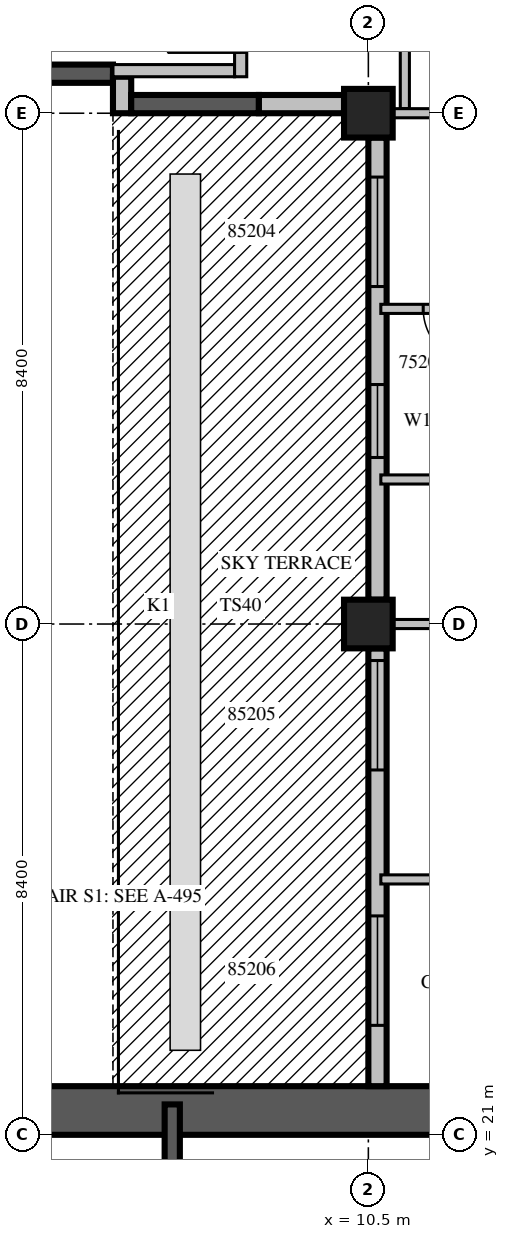
"""IFC4 building model, lengths in metres.
Left out: names, types, materials, properties, quantities, classifications, styles, units other than length and angle.
Written with IfcOpenShell. Run it as: python <this file> out.ifc"""

import sys

from ifc_helpers import new_model, si_unit, direction, frame, frame_2d, origin, origin_2d, place, context, subcontext, project, spatial, rectangle, extrude, source, transform, mapped, element, fill, save


model = new_model("IFC4")
c1 = context("Model", 3, precision=1e-05, world=origin(), true_north=direction((0.0, 1.0)))
c2 = subcontext(c1, "Body", "Model", "MODEL_VIEW")
j1 = project(units=[si_unit("LENGTHUNIT", "METRE"), si_unit("PLANEANGLEUNIT", "RADIAN")], contexts=[c1])
p1 = place(None, origin())
s1 = spatial("IfcSite", under=j1, at=p1, CompositionType="ELEMENT")
p2 = place(p1, origin())
s2 = spatial("IfcBuilding", under=s1, at=p2, CompositionType="ELEMENT")
p3 = place(p2, frame((0.0, 0.0, 231.0)))
s3 = spatial("IfcBuildingStorey", under=s2, at=p3, CompositionType="ELEMENT", Elevation=231.0)
m1 = source(origin(), c2, "Body", "SweptSolid", [
    extrude(rectangle(XDim=0.8, YDim=0.8, at=origin_2d()), origin(), (0.0, 0.0, 1.0), 3.8),
])
for number, where, z_axis, x_axis in (
    (1, (10.5, 29.4, 0.0), (0.0, 0.0, 1.0), (1.0, 0.0, 0.0)),
    (2, (10.5, 37.8, 0.0), (0.0, 0.0, 1.0), (1.0, 0.0, 0.0)),
):
    element("IfcColumn", number, at=place(p3, frame(where, z_axis=z_axis, x_axis=x_axis)), inside=s3, PredefinedType="COLUMN", context=c2, shape_type="MappedRepresentation", body=[
        mapped(m1, transform((0.0, 0.0, 0.0), scale=1.0)),
    ])
m2 = source(origin(), c2, "Body", "SweptSolid", [
    extrude(rectangle(XDim=16.8, YDim=0.8, at=frame_2d((8.4, 0.0))), origin(), (0.0, 0.0, 1.0), 3.8),
])
p4 = place(p3, frame((4.2, 21.4, 0.0), z_axis=(0.0, 0.0, 1.0), x_axis=(1.0, 0.0, 0.0)))
e3 = element("IfcWall", 3, at=p4, inside=s3, PredefinedType="SHEAR", context=c2, shape_type="MappedRepresentation", body=[
    mapped(m2, transform((0.0, 0.0, 0.0), scale=1.0)),
])
m3 = source(origin(), c2, "Body", "SweptSolid", [
    extrude(rectangle(XDim=1.2, YDim=2.1, at=frame_2d((0.6, 1.05))), frame((0.0, 0.41, 0.0), z_axis=(0.0, -1.0, 0.0), x_axis=(1.0, 0.0, 0.0)), (0.0, 0.0, 1.0), 0.82),
])
p5 = place(p4, frame((7.4, 0.0, 0.0)))
e4 = element("IfcOpeningElement", 4, at=p5, cuts=e3, PredefinedType="OPENING", context=c2, shape_type="MappedRepresentation", body=[
    mapped(m3, transform((0.0, 0.0, 0.0), scale=1.0)),
])
m4 = source(origin(), c2, "Body", "SweptSolid", [
    extrude(rectangle(XDim=6.1, YDim=0.3, at=frame_2d((3.05, 0.0))), origin(), (0.0, 0.0, 1.0), 3.4),
])
p6 = place(p3, frame((0.2, 38.45, 0.0), z_axis=(0.0, 0.0, 1.0), x_axis=(1.0, 0.0, 0.0)))
e5 = element("IfcWall", 5, at=p6, inside=s3, PredefinedType="SOLIDWALL", context=c2, shape_type="MappedRepresentation", body=[
    mapped(m4, transform((0.0, 0.0, 0.0), scale=1.0)),
])
m5 = source(origin(), c2, "Body", "SweptSolid", [
    extrude(rectangle(XDim=0.6, YDim=0.3, at=frame_2d((0.3, 0.0))), origin(), (0.0, 0.0, 1.0), 3.4),
])
p7 = place(p3, frame((6.45, 38.4, 0.0), z_axis=(0.0, 0.0, 1.0), x_axis=(0.0, -1.0, 0.0)))
e6 = element("IfcWall", 6, at=p7, inside=s3, PredefinedType="STANDARD", context=c2, shape_type="MappedRepresentation", body=[
    mapped(m5, transform((0.0, 0.0, 0.0), scale=1.0)),
])
m6 = source(origin(), c2, "Body", "SweptSolid", [
    extrude(rectangle(XDim=2.1, YDim=0.3, at=frame_2d((1.05, 0.0))), origin(), (0.0, 0.0, 1.0), 3.4),
])
p8 = place(p3, frame((6.6, 37.95, 0.0), z_axis=(0.0, 0.0, 1.0), x_axis=(1.0, 0.0, 0.0)))
e7 = element("IfcWall", 7, at=p8, inside=s3, PredefinedType="SOLIDWALL", context=c2, shape_type="MappedRepresentation", body=[
    mapped(m6, transform((0.0, 0.0, 0.0), scale=1.0)),
])
p9 = place(p3, frame((8.7, 37.95, 0.0), z_axis=(0.0, 0.0, 1.0), x_axis=(1.0, 0.0, 0.0)))
e8 = element("IfcWall", 8, at=p9, inside=s3, PredefinedType="STANDARD", context=c2, shape_type="SweptSolid", body=[
    extrude(rectangle(XDim=1.4, YDim=0.3, at=frame_2d((0.7, 0.0))), origin(), (0.0, 0.0, 1.0), 3.4),
])
m7 = source(origin(), c2, "Body", "SweptSolid", [
    extrude(rectangle(XDim=7.6, YDim=0.3, at=frame_2d((3.8, 0.0))), origin(), (0.0, 0.0, 1.0), 3.4),
])
p10 = place(p3, frame((10.65, 37.4, 0.0), z_axis=(0.0, 0.0, 1.0), x_axis=(0.0, -1.0, 0.0)))
e9 = element("IfcWall", 9, at=p10, inside=s3, PredefinedType="STANDARD", context=c2, shape_type="MappedRepresentation", body=[
    mapped(m7, transform((0.0, 0.0, 0.0), scale=1.0)),
])
m8 = source(origin(), c2, "Body", "SweptSolid", [
    extrude(rectangle(XDim=1.8, YDim=2.4, at=frame_2d((0.9, 1.2))), frame((0.0, 0.16, 0.0), z_axis=(0.0, -1.0, 0.0), x_axis=(1.0, 0.0, 0.0)), (0.0, 0.0, 1.0), 0.32),
])
p11 = place(p10, frame((0.65, 0.0, 0.0)))
e10 = element("IfcOpeningElement", 10, at=p11, cuts=e9, PredefinedType="OPENING", context=c2, shape_type="MappedRepresentation", body=[
    mapped(m8, transform((0.0, 0.0, 0.0), scale=1.0)),
])
m9 = source(origin(), c2, "Body", "SweptSolid", [
    extrude(rectangle(XDim=1.2, YDim=2.3, at=frame_2d((0.6, 1.15))), frame((0.0, 0.16, 0.0), z_axis=(0.0, -1.0, 0.0), x_axis=(1.0, 0.0, 0.0)), (0.0, 0.0, 1.0), 0.32),
])
p12 = place(p10, frame((4.061, 0.0, 0.6)))
e11 = element("IfcOpeningElement", 11, at=p12, cuts=e9, PredefinedType="OPENING", context=c2, shape_type="MappedRepresentation", body=[
    mapped(m9, transform((0.0, 0.0, 0.0), scale=1.0)),
])
m10 = source(origin(), c2, "Body", "SweptSolid", [
    extrude(rectangle(XDim=7.2, YDim=0.3, at=frame_2d((3.6, 0.0))), origin(), (0.0, 0.0, 1.0), 3.4),
])
p13 = place(p3, frame((10.65, 29.0, 0.0), z_axis=(0.0, 0.0, 1.0), x_axis=(0.0, -1.0, 0.0)))
e12 = element("IfcWall", 12, at=p13, inside=s3, PredefinedType="STANDARD", context=c2, shape_type="MappedRepresentation", body=[
    mapped(m10, transform((0.0, 0.0, 0.0), scale=1.0)),
])
p14 = place(p13, frame((0.2, 0.0, 0.0)))
e13 = element("IfcOpeningElement", 13, at=p14, cuts=e12, PredefinedType="OPENING", context=c2, shape_type="MappedRepresentation", body=[
    mapped(m8, transform((0.0, 0.0, 0.0), scale=1.0)),
])
p15 = place(p13, frame((4.4, 0.0, 0.0)))
e14 = element("IfcOpeningElement", 14, at=p15, cuts=e12, PredefinedType="OPENING", context=c2, shape_type="MappedRepresentation", body=[
    mapped(m8, transform((0.0, 0.0, 0.0), scale=1.0)),
])
m11 = source(origin(), c2, "Body", "SweptSolid", [
    extrude(rectangle(XDim=6.6, YDim=0.25, at=frame_2d((3.3, 0.0))), origin(), (0.0, 0.0, 1.0), 3.4),
])
p16 = place(p3, frame((7.275, 14.9, 0.0), z_axis=(0.0, 0.0, 1.0), x_axis=(0.0, 1.0, 0.0)))
e15 = element("IfcWall", 15, at=p16, inside=s3, PredefinedType="SOLIDWALL", context=c2, shape_type="MappedRepresentation", body=[
    mapped(m11, transform((0.0, 0.0, 0.0), scale=1.0)),
])
m12 = source(origin(), c2, "Body", "SweptSolid", [
    extrude(rectangle(XDim=1.1, YDim=2.1, at=frame_2d((0.55, 1.05))), frame((0.0, 0.135, 0.0), z_axis=(0.0, -1.0, 0.0), x_axis=(1.0, 0.0, 0.0)), (0.0, 0.0, 1.0), 0.27),
])
p17 = place(p16, frame((0.15, 0.0, 0.0)))
e16 = element("IfcOpeningElement", 16, at=p17, cuts=e15, PredefinedType="OPENING", context=c2, shape_type="MappedRepresentation", body=[
    mapped(m12, transform((0.0, 0.0, 0.0), scale=1.0)),
])
m13 = source(origin(), c2, "Body", "SweptSolid", [
    extrude(rectangle(XDim=2.0, YDim=0.2, at=frame_2d((1.0, 0.0))), origin(), (0.0, 0.0, 1.0), 3.4),
])
p18 = place(p3, frame((6.3, 38.5, 0.0), z_axis=(0.0, 0.0, 1.0), x_axis=(1.0, 0.0, 0.0)))
e17 = element("IfcWall", 17, at=p18, inside=s3, PredefinedType="PARTITIONING", context=c2, shape_type="MappedRepresentation", body=[
    mapped(m13, transform((0.0, 0.0, 0.0), scale=1.0)),
])
m14 = source(origin(), c2, "Body", "SweptSolid", [
    extrude(rectangle(XDim=5.45, YDim=0.2, at=frame_2d((2.725, 0.0))), origin(), (0.0, 0.0, 1.0), 3.4),
])
p19 = place(p3, frame((8.4, 38.4, 0.0), z_axis=(0.0, 0.0, 1.0), x_axis=(0.0, 1.0, 0.0)))
e18 = element("IfcWall", 18, at=p19, inside=s3, PredefinedType="PARTITIONING", context=c2, shape_type="MappedRepresentation", body=[
    mapped(m14, transform((0.0, 0.0, 0.0), scale=1.0)),
])
m15 = source(origin(), c2, "Body", "SweptSolid", [
    extrude(rectangle(XDim=1.2, YDim=2.1, at=frame_2d((0.6, 1.05))), frame((0.0, 0.11, 0.0), z_axis=(0.0, -1.0, 0.0), x_axis=(1.0, 0.0, 0.0)), (0.0, 0.0, 1.0), 0.22),
])
p20 = place(p19, frame((0.4, 0.0, 0.0)))
e19 = element("IfcOpeningElement", 19, at=p20, cuts=e18, PredefinedType="OPENING", context=c2, shape_type="MappedRepresentation", body=[
    mapped(m15, transform((0.0, 0.0, 0.0), scale=1.0)),
])
m16 = source(origin(), c2, "Body", "SweptSolid", [
    extrude(rectangle(XDim=0.9, YDim=2.1, at=frame_2d((0.45, 1.05))), frame((0.0, 0.11, 0.0), z_axis=(0.0, -1.0, 0.0), x_axis=(1.0, 0.0, 0.0)), (0.0, 0.0, 1.0), 0.22),
])
p21 = place(p19, frame((3.25, 0.0, 0.0)))
e20 = element("IfcOpeningElement", 20, at=p21, cuts=e18, PredefinedType="OPENING", context=c2, shape_type="MappedRepresentation", body=[
    mapped(m16, transform((0.0, 0.0, 0.0), scale=1.0)),
])
m17 = source(origin(), c2, "Body", "SweptSolid", [
    extrude(rectangle(XDim=4.295, YDim=0.15, at=frame_2d((2.147, 0.0))), origin(), (0.0, 0.0, 1.0), 3.4),
])
p22 = place(p3, frame((10.705, 25.2, 0.0), z_axis=(0.0, 0.0, 1.0), x_axis=(1.0, 0.0, 0.0)))
e21 = element("IfcWall", 21, at=p22, inside=s3, PredefinedType="PARTITIONING", context=c2, shape_type="MappedRepresentation", body=[
    mapped(m17, transform((0.0, 0.0, 0.0), scale=1.0)),
])
m18 = source(origin(), c2, "Body", "SweptSolid", [
    extrude(rectangle(XDim=0.9, YDim=2.1, at=frame_2d((0.45, 1.05))), frame((0.0, 0.085, 0.0), z_axis=(0.0, -1.0, 0.0), x_axis=(1.0, 0.0, 0.0)), (0.0, 0.0, 1.0), 0.17),
])
p23 = place(p22, frame((2.283, 0.0, 0.0)))
e22 = element("IfcOpeningElement", 22, at=p23, cuts=e21, PredefinedType="OPENING", context=c2, shape_type="MappedRepresentation", body=[
    mapped(m18, transform((0.0, 0.0, 0.0), scale=1.0)),
])
m19 = source(origin(), c2, "Body", "SweptSolid", [
    extrude(rectangle(XDim=4.101, YDim=0.15, at=frame_2d((2.05, 0.0))), origin(), (0.0, 0.0, 1.0), 3.4),
])
p24 = place(p3, frame((15.0, 29.4, 0.0), z_axis=(0.0, 0.0, 1.0), x_axis=(-1.0, 0.0, 0.0)))
e23 = element("IfcWall", 23, at=p24, inside=s3, PredefinedType="PARTITIONING", context=c2, shape_type="MappedRepresentation", body=[
    mapped(m19, transform((0.0, 0.0, 0.0), scale=1.0)),
])
m20 = source(origin(), c2, "Body", "SweptSolid", [
    extrude(rectangle(XDim=6.45, YDim=0.15, at=frame_2d((3.225, 0.0))), origin(), (0.0, 0.0, 1.0), 3.4),
])
p25 = place(p3, frame((11.1, 44.325, 0.0), z_axis=(0.0, 0.0, 1.0), x_axis=(0.0, -1.0, 0.0)))
e24 = element("IfcWall", 24, at=p25, inside=s3, PredefinedType="PARTITIONING", context=c2, shape_type="MappedRepresentation", body=[
    mapped(m20, transform((0.0, 0.0, 0.0), scale=1.0)),
])
p26 = place(p3, frame((15.0, 31.777, 0.0), z_axis=(0.0, 0.0, 1.0), x_axis=(-1.0, 0.0, 0.0)))
e25 = element("IfcWall", 25, at=p26, inside=s3, PredefinedType="PARTITIONING", context=c2, shape_type="MappedRepresentation", body=[
    mapped(m17, transform((0.0, 0.0, 0.0), scale=1.0)),
])
p27 = place(p26, frame((1.698, 0.0, 0.0)))
e26 = element("IfcOpeningElement", 26, at=p27, cuts=e25, PredefinedType="OPENING", context=c2, shape_type="MappedRepresentation", body=[
    mapped(m18, transform((0.0, 0.0, 0.0), scale=1.0)),
])
p28 = place(p3, frame((15.0, 34.583, 0.0), z_axis=(0.0, 0.0, 1.0), x_axis=(-1.0, 0.0, 0.0)))
e27 = element("IfcWall", 27, at=p28, inside=s3, PredefinedType="PARTITIONING", context=c2, shape_type="MappedRepresentation", body=[
    mapped(m17, transform((0.0, 0.0, 0.0), scale=1.0)),
])
p29 = place(p28, frame((1.698, 0.0, 0.0)))
e28 = element("IfcOpeningElement", 28, at=p29, cuts=e27, PredefinedType="OPENING", context=c2, shape_type="MappedRepresentation", body=[
    mapped(m18, transform((0.0, 0.0, 0.0), scale=1.0)),
])
p30 = place(p28, frame((0.698, 0.0, 0.0)))
e29 = element("IfcOpeningElement", 29, at=p30, cuts=e27, PredefinedType="OPENING", context=c2, shape_type="MappedRepresentation", body=[
    mapped(m18, transform((0.0, 0.0, 0.0), scale=1.0)),
])
p31 = place(p28, frame((2.698, 0.0, 0.0)))
e30 = element("IfcOpeningElement", 30, at=p31, cuts=e27, PredefinedType="OPENING", context=c2, shape_type="MappedRepresentation", body=[
    mapped(m18, transform((0.0, 0.0, 0.0), scale=1.0)),
])
p32 = place(p3, frame((15.0, 37.8, 0.0), z_axis=(0.0, 0.0, 1.0), x_axis=(-1.0, 0.0, 0.0)))
e31 = element("IfcWall", 31, at=p32, inside=s3, PredefinedType="PARTITIONING", context=c2, shape_type="MappedRepresentation", body=[
    mapped(m19, transform((0.0, 0.0, 0.0), scale=1.0)),
])
m21 = source(origin(), c2, "Body", "SweptSolid", [
    extrude(rectangle(XDim=1.8, YDim=2.4, at=frame_2d((0.9, 1.2))), frame((0.0, 0.025, 0.0), z_axis=(0.0, -1.0, 0.0), x_axis=(1.0, 0.0, 0.0)), (0.0, 0.0, 1.0), 0.05),
])
p33 = place(p11, origin())
e32 = element("IfcDoor", 32, at=p33, inside=s3, OperationType="SLIDING_TO_LEFT", PredefinedType="DOOR", context=c2, shape_type="MappedRepresentation", body=[
    mapped(m21, transform((0.0, 0.0, 0.0), scale=1.0)),
])
fill(e10, e32)
p34 = place(p14, origin())
e33 = element("IfcDoor", 33, at=p34, inside=s3, OperationType="SLIDING_TO_LEFT", PredefinedType="DOOR", context=c2, shape_type="MappedRepresentation", body=[
    mapped(m21, transform((0.0, 0.0, 0.0), scale=1.0)),
])
fill(e13, e33)
p35 = place(p15, origin())
e34 = element("IfcDoor", 34, at=p35, inside=s3, OperationType="SLIDING_TO_LEFT", PredefinedType="DOOR", context=c2, shape_type="MappedRepresentation", body=[
    mapped(m21, transform((0.0, 0.0, 0.0), scale=1.0)),
])
fill(e14, e34)
m22 = source(origin(), c2, "Body", "SweptSolid", [
    extrude(rectangle(XDim=1.2, YDim=2.3, at=frame_2d((0.6, 1.15))), frame((0.0, 0.03, 0.0), z_axis=(0.0, -1.0, 0.0), x_axis=(1.0, 0.0, 0.0)), (0.0, 0.0, 1.0), 0.06),
])
p36 = place(p12, origin())
e35 = element("IfcWindow", 35, at=p36, inside=s3, PartitioningType="SINGLE_PANEL", PredefinedType="WINDOW", context=c2, shape_type="MappedRepresentation", body=[
    mapped(m22, transform((0.0, 0.0, 0.0), scale=1.0)),
])
fill(e11, e35)
m23 = source(origin(), c2, "Body", "SweptSolid", [
    extrude(rectangle(XDim=0.9, YDim=2.1, at=frame_2d((0.45, 1.05))), frame((0.0, 0.025, 0.0), z_axis=(0.0, -1.0, 0.0), x_axis=(1.0, 0.0, 0.0)), (0.0, 0.0, 1.0), 0.05),
])
p37 = place(p31, origin())
e36 = element("IfcDoor", 36, at=p37, inside=s3, OperationType="SINGLE_SWING_LEFT", PredefinedType="DOOR", context=c2, shape_type="MappedRepresentation", body=[
    mapped(m23, transform((0.0, 0.0, 0.0), scale=1.0)),
])
fill(e30, e36)
save(model, sys.argv[1])
